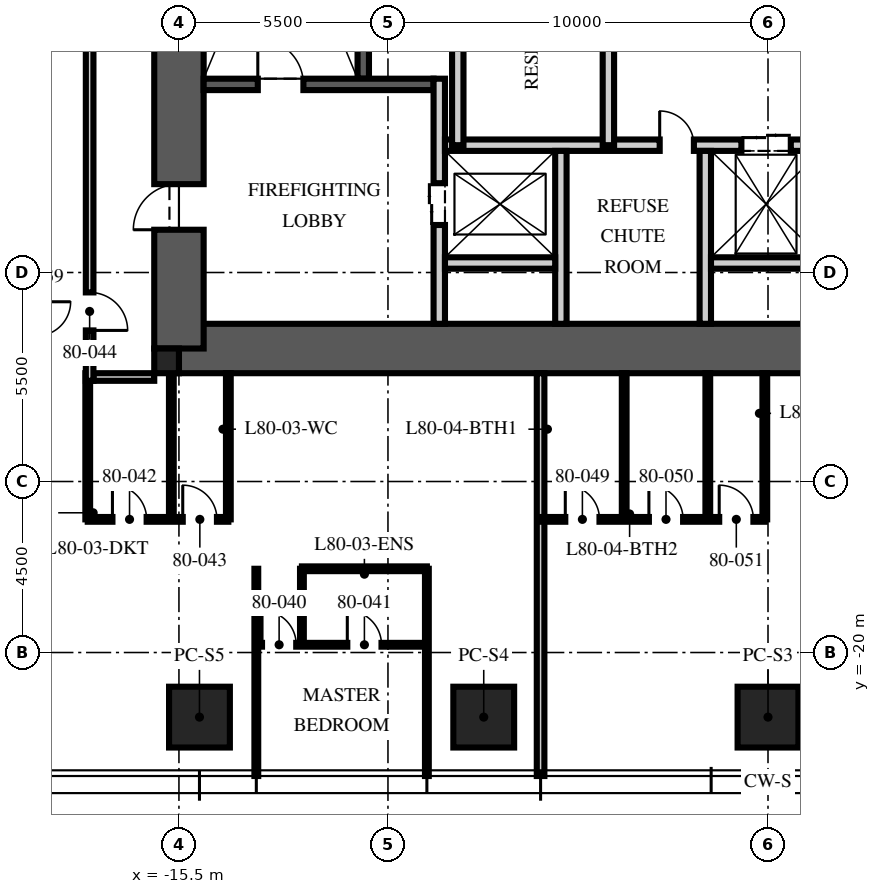
"""IFC4 building model, lengths in metres.
Left out: names, types, materials, properties, quantities, classifications, styles, units other than length and angle.
Written with IfcOpenShell. Run it as: python <this file> out.ifc"""

import sys

from ifc_helpers import new_model, si_unit, direction, frame, frame_2d, origin, origin_2d, place, context, subcontext, project, spatial, rectangle, extrude, element, fill, save


model = new_model("IFC4")
c1 = context("Model", 3, precision=1e-05, world=origin(), true_north=direction((0.0, 1.0)))
c2 = subcontext(c1, "Body", "Model", "MODEL_VIEW")
j1 = project(units=[si_unit("LENGTHUNIT", "METRE"), si_unit("PLANEANGLEUNIT", "RADIAN")], contexts=[c1])
p1 = place(None, origin())
s1 = spatial("IfcSite", under=j1, at=p1, CompositionType="ELEMENT")
p2 = place(p1, origin())
s2 = spatial("IfcBuilding", under=s1, at=p2, CompositionType="ELEMENT")
p3 = place(p2, frame((0.0, 0.0, 319.5)))
s3 = spatial("IfcBuildingStorey", under=s2, at=p3, CompositionType="ELEMENT", Elevation=319.5)
p4 = place(p3, frame((-15.5, -12.0, -0.25), z_axis=(0.0, 0.0, 1.0), x_axis=(1.0, 0.0, 0.0)))
e1 = element("IfcWall", 1, at=p4, inside=s3, PredefinedType="SHEAR", context=c2, shape_type="SweptSolid", body=[
    extrude(rectangle(XDim=31.0, YDim=1.3, at=frame_2d((15.5, 0.0))), origin(), (0.0, 0.0, 1.0), 3.75),
])
p5 = place(p3, frame((-15.5, -12.0, -0.25), z_axis=(0.0, 0.0, 1.0), x_axis=(0.0, 1.0, 0.0)))
e2 = element("IfcWall", 2, at=p5, inside=s3, PredefinedType="SHEAR", context=c2, shape_type="SweptSolid", body=[
    extrude(rectangle(XDim=24.0, YDim=1.3, at=frame_2d((12.0, 0.0))), origin(), (0.0, 0.0, 1.0), 3.75),
])
p6 = place(p5, frame((3.125, 0.0, 0.25)))
e3 = element("IfcOpeningElement", 3, at=p6, cuts=e2, PredefinedType="OPENING", context=c2, shape_type="SweptSolid", body=[
    extrude(rectangle(XDim=1.2, YDim=2.1, at=frame_2d((0.6, 1.05))), frame((0.0, 0.66, 0.0), z_axis=(0.0, -1.0, 0.0), x_axis=(1.0, 0.0, 0.0)), (0.0, 0.0, 1.0), 1.32),
])
p7 = place(p5, frame((19.375, 0.0, 0.25)))
e4 = element("IfcOpeningElement", 4, at=p7, cuts=e2, PredefinedType="OPENING", context=c2, shape_type="SweptSolid", body=[
    extrude(rectangle(XDim=1.8, YDim=2.1, at=frame_2d((0.9, 1.05))), frame((0.0, 0.66, 0.0), z_axis=(0.0, -1.0, 0.0), x_axis=(1.0, 0.0, 0.0)), (0.0, 0.0, 1.0), 1.32),
])
p8 = place(p3, frame((-15.825, -12.325, -0.25), z_axis=(0.0, 0.0, 1.0), x_axis=(1.0, 0.0, 0.0)))
e5 = element("IfcColumn", 5, at=p8, inside=s3, PredefinedType="COLUMN", context=c2, shape_type="SweptSolid", body=[
    extrude(rectangle(XDim=0.65, YDim=0.65, at=origin_2d()), origin(), (0.0, 0.0, 1.0), 3.75),
])
for number, where, z_axis, x_axis in (
    (6, (0.0, -21.7, 0.0), (0.0, 0.0, 1.0), (1.0, 0.0, 0.0)),
    (7, (-7.48, -21.7, 0.0), (0.0, 0.0, 1.0), (1.0, 0.0, 0.0)),
    (8, (-14.96, -21.7, 0.0), (0.0, 0.0, 1.0), (1.0, 0.0, 0.0)),
):
    element("IfcColumn", number, at=place(p3, frame(where, z_axis=z_axis, x_axis=x_axis)), inside=s3, PredefinedType="COLUMN", context=c2, shape_type="SweptSolid", body=[
        extrude(rectangle(XDim=1.6, YDim=1.6, at=origin_2d()), origin(), (0.0, 0.0, 1.0), 3.75),
    ])
p9 = place(p3, frame((-10.65, -4.9, 0.0), z_axis=(0.0, 0.0, 1.0), x_axis=(0.0, 1.0, 0.0)))
e9 = element("IfcWall", 9, at=p9, inside=s3, PredefinedType="SOLIDWALL", context=c2, shape_type="SweptSolid", body=[
    extrude(rectangle(XDim=10.1, YDim=0.3, at=frame_2d((5.05, 0.0))), origin(), (0.0, 0.0, 1.0), 3.5),
])
p10 = place(p3, frame((-14.85, -5.05, 0.0), z_axis=(0.0, 0.0, 1.0), x_axis=(1.0, 0.0, 0.0)))
e10 = element("IfcWall", 10, at=p10, inside=s3, PredefinedType="SOLIDWALL", context=c2, shape_type="SweptSolid", body=[
    extrude(rectangle(XDim=6.05, YDim=0.3, at=frame_2d((3.025, 0.0))), origin(), (0.0, 0.0, 1.0), 3.5),
])
p11 = place(p10, frame((1.425, 0.0, 0.0)))
e11 = element("IfcOpeningElement", 11, at=p11, cuts=e10, PredefinedType="OPENING", context=c2, shape_type="SweptSolid", body=[
    extrude(rectangle(XDim=1.2, YDim=2.1, at=frame_2d((0.6, 1.05))), frame((0.0, 0.16, 0.0), z_axis=(0.0, -1.0, 0.0), x_axis=(1.0, 0.0, 0.0)), (0.0, 0.0, 1.0), 0.32),
])
p12 = place(p3, frame((-8.65, -11.35, 0.0), z_axis=(0.0, 0.0, 1.0), x_axis=(0.0, 1.0, 0.0)))
e12 = element("IfcWall", 12, at=p12, inside=s3, PredefinedType="PARTITIONING", context=c2, shape_type="SweptSolid", body=[
    extrude(rectangle(XDim=6.45, YDim=0.3, at=frame_2d((3.225, 0.0))), origin(), (0.0, 0.0, 1.0), 3.5),
])
p13 = place(p12, frame((2.6, 0.0, 0.0)))
e13 = element("IfcOpeningElement", 13, at=p13, cuts=e12, PredefinedType="OPENING", context=c2, shape_type="SweptSolid", body=[
    extrude(rectangle(XDim=1.1, YDim=2.1, at=frame_2d((0.55, 1.05))), frame((0.0, 0.16, 0.0), z_axis=(0.0, -1.0, 0.0), x_axis=(1.0, 0.0, 0.0)), (0.0, 0.0, 1.0), 0.32),
])
p14 = place(p3, frame((-8.5, -6.65, 0.0), z_axis=(0.0, 0.0, 1.0), x_axis=(1.0, 0.0, 0.0)))
e14 = element("IfcWall", 14, at=p14, inside=s3, PredefinedType="PARTITIONING", context=c2, shape_type="SweptSolid", body=[
    extrude(rectangle(XDim=17.0, YDim=0.3, at=frame_2d((8.5, 0.0))), origin(), (0.0, 0.0, 1.0), 3.5),
])
p15 = place(p14, frame((7.8, 0.0, 0.0)))
e15 = element("IfcOpeningElement", 15, at=p15, cuts=e14, PredefinedType="OPENING", context=c2, shape_type="SweptSolid", body=[
    extrude(rectangle(XDim=1.3, YDim=2.4, at=frame_2d((0.65, 1.2))), frame((0.0, 0.16, 0.0), z_axis=(0.0, -1.0, 0.0), x_axis=(1.0, 0.0, 0.0)), (0.0, 0.0, 1.0), 0.32),
])
p16 = place(p14, frame((5.65, 0.0, 0.0)))
e16 = element("IfcOpeningElement", 16, at=p16, cuts=e14, PredefinedType="OPENING", context=c2, shape_type="SweptSolid", body=[
    extrude(rectangle(XDim=0.9, YDim=2.1, at=frame_2d((0.45, 1.05))), frame((0.0, 0.16, 0.0), z_axis=(0.0, -1.0, 0.0), x_axis=(1.0, 0.0, 0.0)), (0.0, 0.0, 1.0), 0.32),
])
p17 = place(p14, frame((10.4, 0.0, 0.0)))
e17 = element("IfcOpeningElement", 17, at=p17, cuts=e14, PredefinedType="OPENING", context=c2, shape_type="SweptSolid", body=[
    extrude(rectangle(XDim=0.9, YDim=2.1, at=frame_2d((0.45, 1.05))), frame((0.0, 0.16, 0.0), z_axis=(0.0, -1.0, 0.0), x_axis=(1.0, 0.0, 0.0)), (0.0, 0.0, 1.0), 0.32),
])
for number, where, z_axis, x_axis in (
    (18, (-5.45, -11.35, 0.0), (0.0, 0.0, 1.0), (0.0, 1.0, 0.0)),
    (19, (-1.65, -11.35, 0.0), (0.0, 0.0, 1.0), (0.0, 1.0, 0.0)),
):
    element("IfcWall", number, at=place(p3, frame(where, z_axis=z_axis, x_axis=x_axis)), inside=s3, PredefinedType="PARTITIONING", context=c2, shape_type="SweptSolid", body=[
        extrude(rectangle(XDim=4.55, YDim=0.3, at=frame_2d((2.275, 0.0))), origin(), (0.0, 0.0, 1.0), 3.5),
    ])
for number, where, z_axis, x_axis in (
    (20, (-8.5, -9.75, 0.0), (0.0, 0.0, 1.0), (1.0, 0.0, 0.0)),
    (21, (-1.5, -9.75, 0.0), (0.0, 0.0, 1.0), (1.0, 0.0, 0.0)),
):
    element("IfcWall", number, at=place(p3, frame(where, z_axis=z_axis, x_axis=x_axis)), inside=s3, PredefinedType="PARTITIONING", context=c2, shape_type="SweptSolid", body=[
        extrude(rectangle(XDim=2.9, YDim=0.3, at=frame_2d((1.45, 0.0))), origin(), (0.0, 0.0, 1.0), 3.5),
    ])
p18 = place(p3, frame((-4.2, -6.65, 0.0), z_axis=(0.0, 0.0, 1.0), x_axis=(0.0, 1.0, 0.0)))
e22 = element("IfcWall", 22, at=p18, inside=s3, PredefinedType="PARTITIONING", context=c2, shape_type="SweptSolid", body=[
    extrude(rectangle(XDim=7.45, YDim=0.3, at=frame_2d((3.725, 0.0))), origin(), (0.0, 0.0, 1.0), 3.5),
])
p19 = place(p18, frame((3.275, 0.0, 0.0)))
e23 = element("IfcOpeningElement", 23, at=p19, cuts=e22, PredefinedType="OPENING", context=c2, shape_type="SweptSolid", body=[
    extrude(rectangle(XDim=0.9, YDim=2.1, at=frame_2d((0.45, 1.05))), frame((0.0, 0.16, 0.0), z_axis=(0.0, -1.0, 0.0), x_axis=(1.0, 0.0, 0.0)), (0.0, 0.0, 1.0), 0.32),
])
p20 = place(p3, frame((-8.163, -6.65, 0.0), z_axis=(0.0, 0.0, 1.0), x_axis=(0.0, 1.0, 0.0)))
e24 = element("IfcWall", 24, at=p20, inside=s3, PredefinedType="PARTITIONING", context=c2, shape_type="SweptSolid", body=[
    extrude(rectangle(XDim=7.45, YDim=0.3, at=frame_2d((3.725, 0.0))), origin(), (0.0, 0.0, 1.0), 3.5),
])
p21 = place(p3, frame((-16.15, -12.75, 0.0), z_axis=(0.0, 0.0, 1.0), x_axis=(-1.0, 0.0, 0.0)))
e25 = element("IfcWall", 25, at=p21, inside=s3, PredefinedType="PARTITIONING", context=c2, shape_type="SweptSolid", body=[
    extrude(rectangle(XDim=1.6, YDim=0.2, at=frame_2d((0.8, 0.0))), origin(), (0.0, 0.0, 1.0), 2.6),
])
for number, where, z_axis, x_axis in (
    (26, (-13.464, -17.796, 0.0), (0.0, 0.0, 1.0), (0.0, -1.0, 0.0)),
    (27, (-8.976, -17.796, 0.0), (0.0, 0.0, 1.0), (0.0, -1.0, 0.0)),
):
    element("IfcWall", number, at=place(p3, frame(where, z_axis=z_axis, x_axis=x_axis)), inside=s3, PredefinedType="PARTITIONING", context=c2, shape_type="SweptSolid", body=[
        extrude(rectangle(XDim=5.454, YDim=0.1, at=frame_2d((2.727, 0.0))), origin(), (0.0, 0.0, 1.0), 3.01),
    ])
p22 = place(p3, frame((-5.984, -12.65, 0.0), z_axis=(0.0, 0.0, 1.0), x_axis=(0.0, -1.0, 0.0)))
e28 = element("IfcWall", 28, at=p22, inside=s3, PredefinedType="PARTITIONING", context=c2, shape_type="SweptSolid", body=[
    extrude(rectangle(XDim=10.6, YDim=0.2, at=frame_2d((5.3, 0.0))), origin(), (0.0, 0.0, 1.0), 3.01),
])
p23 = place(p3, frame((-13.464, -19.796, 0.0), z_axis=(0.0, 0.0, 1.0), x_axis=(1.0, 0.0, 0.0)))
e29 = element("IfcWall", 29, at=p23, inside=s3, PredefinedType="PARTITIONING", context=c2, shape_type="SweptSolid", body=[
    extrude(rectangle(XDim=4.488, YDim=0.1, at=frame_2d((2.244, 0.0))), origin(), (0.0, 0.0, 1.0), 2.91),
])
p24 = place(p23, frame((0.15, 0.0, 0.0)))
e30 = element("IfcOpeningElement", 30, at=p24, cuts=e29, PredefinedType="OPENING", context=c2, shape_type="SweptSolid", body=[
    extrude(rectangle(XDim=0.9, YDim=2.1, at=frame_2d((0.45, 1.05))), frame((0.0, 0.06, 0.0), z_axis=(0.0, -1.0, 0.0), x_axis=(1.0, 0.0, 0.0)), (0.0, 0.0, 1.0), 0.12),
])
p25 = place(p23, frame((2.394, 0.0, 0.0)))
e31 = element("IfcOpeningElement", 31, at=p25, cuts=e29, PredefinedType="OPENING", context=c2, shape_type="SweptSolid", body=[
    extrude(rectangle(XDim=0.9, YDim=2.1, at=frame_2d((0.45, 1.05))), frame((0.0, 0.06, 0.0), z_axis=(0.0, -1.0, 0.0), x_axis=(1.0, 0.0, 0.0)), (0.0, 0.0, 1.0), 0.12),
])
p26 = place(p3, frame((-12.264, -17.796, 0.0), z_axis=(0.0, 0.0, 1.0), x_axis=(0.0, -1.0, 0.0)))
e32 = element("IfcWall", 32, at=p26, inside=s3, PredefinedType="PARTITIONING", context=c2, shape_type="SweptSolid", body=[
    extrude(rectangle(XDim=2.0, YDim=0.1, at=frame_2d((1.0, 0.0))), origin(), (0.0, 0.0, 1.0), 3.5),
])
p27 = place(p3, frame((-12.264, -17.796, 0.0), z_axis=(0.0, 0.0, 1.0), x_axis=(1.0, 0.0, 0.0)))
e33 = element("IfcWall", 33, at=p27, inside=s3, PredefinedType="PARTITIONING", context=c2, shape_type="SweptSolid", body=[
    extrude(rectangle(XDim=3.288, YDim=0.125, at=frame_2d((1.644, 0.0))), origin(), (0.0, 0.0, 1.0), 2.91),
])
p28 = place(p3, frame((-17.9, -16.496, 0.0), z_axis=(0.0, 0.0, 1.0), x_axis=(1.0, 0.0, 0.0)))
e34 = element("IfcWall", 34, at=p28, inside=s3, PredefinedType="PARTITIONING", context=c2, shape_type="SweptSolid", body=[
    extrude(rectangle(XDim=3.7, YDim=0.125, at=frame_2d((1.85, 0.0))), origin(), (0.0, 0.0, 1.0), 2.9),
])
p29 = place(p28, frame((0.65, 0.0, 0.0)))
e35 = element("IfcOpeningElement", 35, at=p29, cuts=e34, PredefinedType="OPENING", context=c2, shape_type="SweptSolid", body=[
    extrude(rectangle(XDim=0.9, YDim=2.1, at=frame_2d((0.45, 1.05))), frame((0.0, 0.073, 0.0), z_axis=(0.0, -1.0, 0.0), x_axis=(1.0, 0.0, 0.0)), (0.0, 0.0, 1.0), 0.145),
])
p30 = place(p28, frame((2.5, 0.0, 0.0)))
e36 = element("IfcOpeningElement", 36, at=p30, cuts=e34, PredefinedType="OPENING", context=c2, shape_type="SweptSolid", body=[
    extrude(rectangle(XDim=0.9, YDim=2.1, at=frame_2d((0.45, 1.05))), frame((0.0, 0.073, 0.0), z_axis=(0.0, -1.0, 0.0), x_axis=(1.0, 0.0, 0.0)), (0.0, 0.0, 1.0), 0.145),
])
for number, where, z_axis, x_axis in (
    (37, (-17.9, -12.65, 0.0), (0.0, 0.0, 1.0), (0.0, -1.0, 0.0)),
    (38, (-15.7, -12.65, 0.0), (0.0, 0.0, 1.0), (0.0, -1.0, 0.0)),
):
    element("IfcWall", number, at=place(p3, frame(where, z_axis=z_axis, x_axis=x_axis)), inside=s3, PredefinedType="PARTITIONING", context=c2, shape_type="SweptSolid", body=[
        extrude(rectangle(XDim=3.846, YDim=0.125, at=frame_2d((1.923, 0.0))), origin(), (0.0, 0.0, 1.0), 2.6),
    ])
p31 = place(p3, frame((-14.2, -12.65, 0.0), z_axis=(0.0, 0.0, 1.0), x_axis=(0.0, -1.0, 0.0)))
e39 = element("IfcWall", 39, at=p31, inside=s3, PredefinedType="PARTITIONING", context=c2, shape_type="SweptSolid", body=[
    extrude(rectangle(XDim=3.846, YDim=0.125, at=frame_2d((1.923, 0.0))), origin(), (0.0, 0.0, 1.0), 3.5),
])
p32 = place(p3, frame((-5.984, -16.496, 0.0), z_axis=(0.0, 0.0, 1.0), x_axis=(1.0, 0.0, 0.0)))
e40 = element("IfcWall", 40, at=p32, inside=s3, PredefinedType="PARTITIONING", context=c2, shape_type="SweptSolid", body=[
    extrude(rectangle(XDim=5.9, YDim=0.125, at=frame_2d((2.95, 0.0))), origin(), (0.0, 0.0, 1.0), 2.9),
])
p33 = place(p32, frame((0.65, 0.0, 0.0)))
e41 = element("IfcOpeningElement", 41, at=p33, cuts=e40, PredefinedType="OPENING", context=c2, shape_type="SweptSolid", body=[
    extrude(rectangle(XDim=0.9, YDim=2.1, at=frame_2d((0.45, 1.05))), frame((0.0, 0.073, 0.0), z_axis=(0.0, -1.0, 0.0), x_axis=(1.0, 0.0, 0.0)), (0.0, 0.0, 1.0), 0.145),
])
p34 = place(p32, frame((2.85, 0.0, 0.0)))
e42 = element("IfcOpeningElement", 42, at=p34, cuts=e40, PredefinedType="OPENING", context=c2, shape_type="SweptSolid", body=[
    extrude(rectangle(XDim=0.9, YDim=2.1, at=frame_2d((0.45, 1.05))), frame((0.0, 0.073, 0.0), z_axis=(0.0, -1.0, 0.0), x_axis=(1.0, 0.0, 0.0)), (0.0, 0.0, 1.0), 0.145),
])
p35 = place(p32, frame((4.7, 0.0, 0.0)))
e43 = element("IfcOpeningElement", 43, at=p35, cuts=e40, PredefinedType="OPENING", context=c2, shape_type="SweptSolid", body=[
    extrude(rectangle(XDim=0.9, YDim=2.1, at=frame_2d((0.45, 1.05))), frame((0.0, 0.073, 0.0), z_axis=(0.0, -1.0, 0.0), x_axis=(1.0, 0.0, 0.0)), (0.0, 0.0, 1.0), 0.145),
])
p36 = place(p3, frame((-3.784, -12.65, 0.0), z_axis=(0.0, 0.0, 1.0), x_axis=(0.0, -1.0, 0.0)))
e44 = element("IfcWall", 44, at=p36, inside=s3, PredefinedType="PARTITIONING", context=c2, shape_type="SweptSolid", body=[
    extrude(rectangle(XDim=3.846, YDim=0.125, at=frame_2d((1.923, 0.0))), origin(), (0.0, 0.0, 1.0), 2.91),
])
p37 = place(p3, frame((-1.584, -12.65, 0.0), z_axis=(0.0, 0.0, 1.0), x_axis=(0.0, -1.0, 0.0)))
e45 = element("IfcWall", 45, at=p37, inside=s3, PredefinedType="PARTITIONING", context=c2, shape_type="SweptSolid", body=[
    extrude(rectangle(XDim=3.846, YDim=0.125, at=frame_2d((1.923, 0.0))), origin(), (0.0, 0.0, 1.0), 3.5),
])
p38 = place(p3, frame((-0.084, -12.65, 0.0), z_axis=(0.0, 0.0, 1.0), x_axis=(0.0, -1.0, 0.0)))
e46 = element("IfcWall", 46, at=p38, inside=s3, PredefinedType="PARTITIONING", context=c2, shape_type="SweptSolid", body=[
    extrude(rectangle(XDim=3.846, YDim=0.125, at=frame_2d((1.923, 0.0))), origin(), (0.0, 0.0, 1.0), 2.9),
])
p39 = place(p3, frame((-17.85, 12.85, 0.0), z_axis=(0.0, 0.0, 1.0), x_axis=(0.0, -1.0, 0.0)))
e47 = element("IfcWall", 47, at=p39, inside=s3, PredefinedType="PARTITIONING", context=c2, shape_type="SweptSolid", body=[
    extrude(rectangle(XDim=25.7, YDim=0.2, at=frame_2d((12.85, 0.0))), origin(), (0.0, 0.0, 1.0), 2.9),
])
p40 = place(p39, frame((9.6, 0.0, 0.0)))
e48 = element("IfcOpeningElement", 48, at=p40, cuts=e47, PredefinedType="OPENING", context=c2, shape_type="SweptSolid", body=[
    extrude(rectangle(XDim=1.0, YDim=2.2, at=frame_2d((0.5, 1.1))), frame((0.0, 0.11, 0.0), z_axis=(0.0, -1.0, 0.0), x_axis=(1.0, 0.0, 0.0)), (0.0, 0.0, 1.0), 0.22),
])
p41 = place(p39, frame((23.374, 0.0, 0.0)))
e49 = element("IfcOpeningElement", 49, at=p41, cuts=e47, PredefinedType="OPENING", context=c2, shape_type="SweptSolid", body=[
    extrude(rectangle(XDim=1.0, YDim=2.2, at=frame_2d((0.5, 1.1))), frame((0.0, 0.11, 0.0), z_axis=(0.0, -1.0, 0.0), x_axis=(1.0, 0.0, 0.0)), (0.0, 0.0, 1.0), 0.22),
])
p42 = place(p11, origin())
e50 = element("IfcDoor", 50, at=p42, inside=s3, OperationType="SINGLE_SWING_LEFT", PredefinedType="DOOR", context=c2, shape_type="SweptSolid", body=[
    extrude(rectangle(XDim=1.2, YDim=2.1, at=frame_2d((0.6, 1.05))), frame((0.0, 0.025, 0.0), z_axis=(0.0, -1.0, 0.0), x_axis=(1.0, 0.0, 0.0)), (0.0, 0.0, 1.0), 0.05),
])
fill(e11, e50)
p43 = place(p6, origin())
e51 = element("IfcDoor", 51, at=p43, inside=s3, OperationType="SINGLE_SWING_LEFT", PredefinedType="DOOR", context=c2, shape_type="SweptSolid", body=[
    extrude(rectangle(XDim=1.2, YDim=2.1, at=frame_2d((0.6, 1.05))), frame((0.0, 0.025, 0.0), z_axis=(0.0, -1.0, 0.0), x_axis=(1.0, 0.0, 0.0)), (0.0, 0.0, 1.0), 0.05),
])
fill(e3, e51)
p44 = place(p13, origin())
e52 = element("IfcDoor", 52, at=p44, inside=s3, OperationType="DOUBLE_DOOR_SLIDING", PredefinedType="DOOR", context=c2, shape_type="SweptSolid", body=[
    extrude(rectangle(XDim=1.1, YDim=2.1, at=frame_2d((0.55, 1.05))), frame((0.0, 0.025, 0.0), z_axis=(0.0, -1.0, 0.0), x_axis=(1.0, 0.0, 0.0)), (0.0, 0.0, 1.0), 0.05),
])
fill(e13, e52)
p45 = place(p15, origin())
e53 = element("IfcDoor", 53, at=p45, inside=s3, OperationType="DOUBLE_DOOR_SLIDING", PredefinedType="DOOR", context=c2, shape_type="SweptSolid", body=[
    extrude(rectangle(XDim=1.3, YDim=2.4, at=frame_2d((0.65, 1.2))), frame((0.0, 0.025, 0.0), z_axis=(0.0, -1.0, 0.0), x_axis=(1.0, 0.0, 0.0)), (0.0, 0.0, 1.0), 0.05),
])
fill(e15, e53)
p46 = place(p16, origin())
e54 = element("IfcDoor", 54, at=p46, inside=s3, OperationType="SINGLE_SWING_LEFT", PredefinedType="DOOR", context=c2, shape_type="SweptSolid", body=[
    extrude(rectangle(XDim=0.9, YDim=2.1, at=frame_2d((0.45, 1.05))), frame((0.0, 0.025, 0.0), z_axis=(0.0, -1.0, 0.0), x_axis=(1.0, 0.0, 0.0)), (0.0, 0.0, 1.0), 0.05),
])
fill(e16, e54)
p47 = place(p24, origin())
e55 = element("IfcDoor", 55, at=p47, inside=s3, OperationType="SINGLE_SWING_LEFT", PredefinedType="DOOR", context=c2, shape_type="SweptSolid", body=[
    extrude(rectangle(XDim=0.9, YDim=2.1, at=frame_2d((0.45, 1.05))), frame((0.0, 0.025, 0.0), z_axis=(0.0, -1.0, 0.0), x_axis=(1.0, 0.0, 0.0)), (0.0, 0.0, 1.0), 0.05),
])
fill(e30, e55)
p48 = place(p25, origin())
e56 = element("IfcDoor", 56, at=p48, inside=s3, OperationType="SINGLE_SWING_LEFT", PredefinedType="DOOR", context=c2, shape_type="SweptSolid", body=[
    extrude(rectangle(XDim=0.9, YDim=2.1, at=frame_2d((0.45, 1.05))), frame((0.0, 0.025, 0.0), z_axis=(0.0, -1.0, 0.0), x_axis=(1.0, 0.0, 0.0)), (0.0, 0.0, 1.0), 0.05),
])
fill(e31, e56)
p49 = place(p29, origin())
e57 = element("IfcDoor", 57, at=p49, inside=s3, OperationType="SINGLE_SWING_LEFT", PredefinedType="DOOR", context=c2, shape_type="SweptSolid", body=[
    extrude(rectangle(XDim=0.9, YDim=2.1, at=frame_2d((0.45, 1.05))), frame((0.0, 0.025, 0.0), z_axis=(0.0, -1.0, 0.0), x_axis=(1.0, 0.0, 0.0)), (0.0, 0.0, 1.0), 0.05),
])
fill(e35, e57)
p50 = place(p30, origin())
e58 = element("IfcDoor", 58, at=p50, inside=s3, OperationType="SINGLE_SWING_LEFT", PredefinedType="DOOR", context=c2, shape_type="SweptSolid", body=[
    extrude(rectangle(XDim=0.9, YDim=2.1, at=frame_2d((0.45, 1.05))), frame((0.0, 0.025, 0.0), z_axis=(0.0, -1.0, 0.0), x_axis=(1.0, 0.0, 0.0)), (0.0, 0.0, 1.0), 0.05),
])
fill(e36, e58)
p51 = place(p41, origin())
e59 = element("IfcDoor", 59, at=p51, inside=s3, OperationType="SINGLE_SWING_RIGHT", PredefinedType="DOOR", context=c2, shape_type="SweptSolid", body=[
    extrude(rectangle(XDim=1.0, YDim=2.2, at=frame_2d((0.5, 1.1))), frame((0.0, 0.025, 0.0), z_axis=(0.0, -1.0, 0.0), x_axis=(1.0, 0.0, 0.0)), (0.0, 0.0, 1.0), 0.05),
])
fill(e49, e59)
p52 = place(p33, origin())
e60 = element("IfcDoor", 60, at=p52, inside=s3, OperationType="SINGLE_SWING_LEFT", PredefinedType="DOOR", context=c2, shape_type="SweptSolid", body=[
    extrude(rectangle(XDim=0.9, YDim=2.1, at=frame_2d((0.45, 1.05))), frame((0.0, 0.025, 0.0), z_axis=(0.0, -1.0, 0.0), x_axis=(1.0, 0.0, 0.0)), (0.0, 0.0, 1.0), 0.05),
])
fill(e41, e60)
p53 = place(p34, origin())
e61 = element("IfcDoor", 61, at=p53, inside=s3, OperationType="SINGLE_SWING_LEFT", PredefinedType="DOOR", context=c2, shape_type="SweptSolid", body=[
    extrude(rectangle(XDim=0.9, YDim=2.1, at=frame_2d((0.45, 1.05))), frame((0.0, 0.025, 0.0), z_axis=(0.0, -1.0, 0.0), x_axis=(1.0, 0.0, 0.0)), (0.0, 0.0, 1.0), 0.05),
])
fill(e42, e61)
p54 = place(p35, origin())
e62 = element("IfcDoor", 62, at=p54, inside=s3, OperationType="SINGLE_SWING_LEFT", PredefinedType="DOOR", context=c2, shape_type="SweptSolid", body=[
    extrude(rectangle(XDim=0.9, YDim=2.1, at=frame_2d((0.45, 1.05))), frame((0.0, 0.025, 0.0), z_axis=(0.0, -1.0, 0.0), x_axis=(1.0, 0.0, 0.0)), (0.0, 0.0, 1.0), 0.05),
])
fill(e43, e62)
save(model, sys.argv[1])
